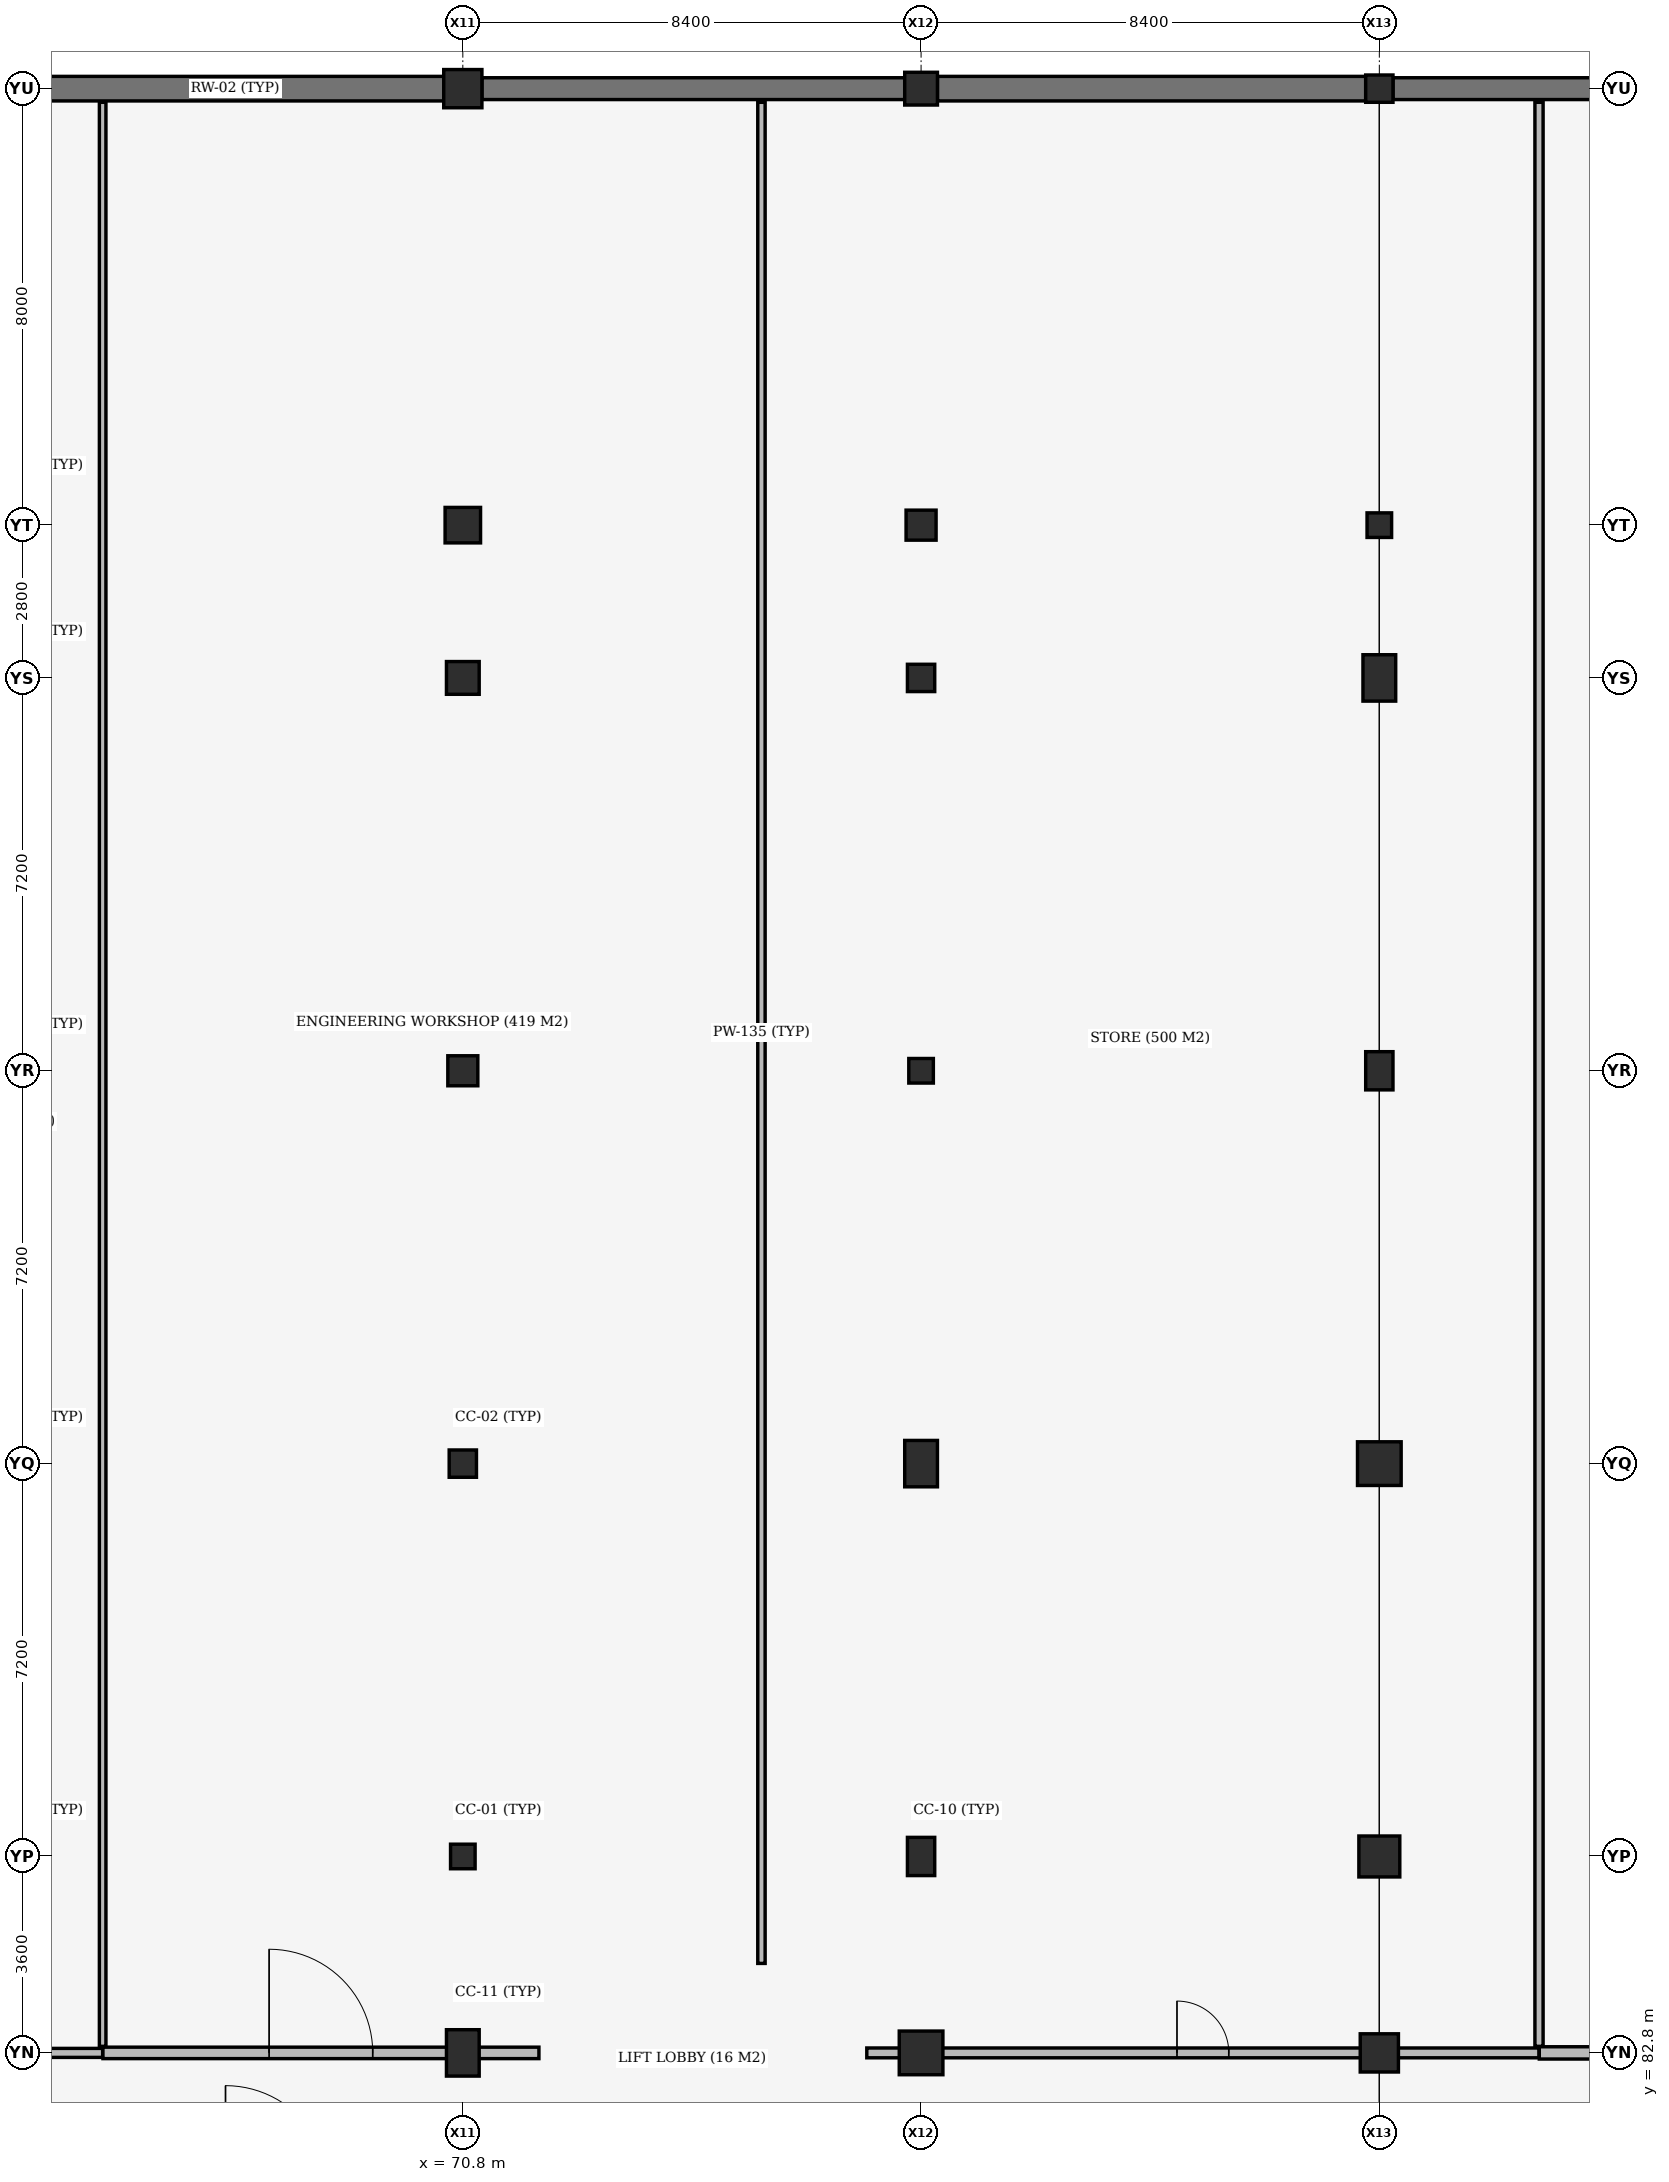
"""IFC4 building model, lengths in metres.
Left out: names, types, materials, properties, quantities, classifications, styles, units other than length and angle.
Written with IfcOpenShell. Run it as: python <this file> out.ifc"""

import sys

from ifc_helpers import new_model, si_unit, direction, frame, frame_2d, origin, origin_2d, place, context, subcontext, project, spatial, rectangle, extrude, element, fill, save


model = new_model("IFC4")
c1 = context("Model", 3, precision=1e-05, world=origin(), true_north=direction((0.0, 1.0)))
c2 = subcontext(c1, "Body", "Model", "MODEL_VIEW")
j1 = project(units=[si_unit("LENGTHUNIT", "METRE"), si_unit("PLANEANGLEUNIT", "RADIAN")], contexts=[c1])
p1 = place(None, origin())
s1 = spatial("IfcSite", under=j1, at=p1, CompositionType="ELEMENT")
p2 = place(p1, origin())
s2 = spatial("IfcBuilding", under=s1, at=p2, CompositionType="ELEMENT")
p3 = place(p2, frame((0.0, 0.0, -4.5)))
s3 = spatial("IfcBuildingStorey", under=s2, at=p3, CompositionType="ELEMENT", Elevation=-4.5)
p4 = place(p3, frame((70.8, 82.8, -0.46), z_axis=(0.0, 0.0, 1.0), x_axis=(1.0, 0.0, 0.0)))
e1 = element("IfcColumn", 1, at=p4, inside=s3, PredefinedType="COLUMN", context=c2, shape_type="SweptSolid", body=[
    extrude(rectangle(XDim=0.6, YDim=0.85, at=origin_2d()), origin(), (0.0, 0.0, 1.0), 4.61),
])
p5 = place(p3, frame((70.8, 86.4, -0.46), z_axis=(0.0, 0.0, 1.0), x_axis=(1.0, 0.0, 0.0)))
e2 = element("IfcColumn", 2, at=p5, inside=s3, PredefinedType="COLUMN", context=c2, shape_type="SweptSolid", body=[
    extrude(rectangle(XDim=0.45, YDim=0.45, at=origin_2d()), origin(), (0.0, 0.0, 1.0), 4.61),
])
p6 = place(p3, frame((70.8, 93.6, -0.46), z_axis=(0.0, 0.0, 1.0), x_axis=(1.0, 0.0, 0.0)))
e3 = element("IfcColumn", 3, at=p6, inside=s3, PredefinedType="COLUMN", context=c2, shape_type="SweptSolid", body=[
    extrude(rectangle(XDim=0.5, YDim=0.5, at=origin_2d()), origin(), (0.0, 0.0, 1.0), 4.72),
])
p7 = place(p3, frame((70.8, 100.8, -0.46), z_axis=(0.0, 0.0, 1.0), x_axis=(1.0, 0.0, 0.0)))
e4 = element("IfcColumn", 4, at=p7, inside=s3, PredefinedType="COLUMN", context=c2, shape_type="SweptSolid", body=[
    extrude(rectangle(XDim=0.55, YDim=0.55, at=origin_2d()), origin(), (0.0, 0.0, 1.0), 4.72),
])
p8 = place(p3, frame((70.8, 108.0, -0.46), z_axis=(0.0, 0.0, 1.0), x_axis=(1.0, 0.0, 0.0)))
e5 = element("IfcColumn", 5, at=p8, inside=s3, PredefinedType="COLUMN", context=c2, shape_type="SweptSolid", body=[
    extrude(rectangle(XDim=0.6, YDim=0.6, at=origin_2d()), origin(), (0.0, 0.0, 1.0), 4.61),
])
p9 = place(p3, frame((70.8, 110.8, -0.46), z_axis=(0.0, 0.0, 1.0), x_axis=(1.0, 0.0, 0.0)))
e6 = element("IfcColumn", 6, at=p9, inside=s3, PredefinedType="COLUMN", context=c2, shape_type="SweptSolid", body=[
    extrude(rectangle(XDim=0.65, YDim=0.65, at=origin_2d()), origin(), (0.0, 0.0, 1.0), 4.61),
])
p10 = place(p3, frame((70.8, 118.8, -0.46), z_axis=(0.0, 0.0, 1.0), x_axis=(1.0, 0.0, 0.0)))
e7 = element("IfcColumn", 7, at=p10, inside=s3, PredefinedType="COLUMN", context=c2, shape_type="SweptSolid", body=[
    extrude(rectangle(XDim=0.7, YDim=0.7, at=origin_2d()), origin(), (0.0, 0.0, 1.0), 4.61),
])
p11 = place(p3, frame((79.2, 82.8, -0.46), z_axis=(0.0, 0.0, 1.0), x_axis=(1.0, 0.0, 0.0)))
e8 = element("IfcColumn", 8, at=p11, inside=s3, PredefinedType="COLUMN", context=c2, shape_type="SweptSolid", body=[
    extrude(rectangle(XDim=0.8, YDim=0.8, at=origin_2d()), origin(), (0.0, 0.0, 1.0), 4.61),
])
p12 = place(p3, frame((79.2, 86.4, -0.46), z_axis=(0.0, 0.0, 1.0), x_axis=(1.0, 0.0, 0.0)))
e9 = element("IfcColumn", 9, at=p12, inside=s3, PredefinedType="COLUMN", context=c2, shape_type="SweptSolid", body=[
    extrude(rectangle(XDim=0.5, YDim=0.7, at=origin_2d()), origin(), (0.0, 0.0, 1.0), 4.61),
])
p13 = place(p3, frame((79.2, 93.6, -0.46), z_axis=(0.0, 0.0, 1.0), x_axis=(1.0, 0.0, 0.0)))
e10 = element("IfcColumn", 10, at=p13, inside=s3, PredefinedType="COLUMN", context=c2, shape_type="SweptSolid", body=[
    extrude(rectangle(XDim=0.6, YDim=0.85, at=origin_2d()), origin(), (0.0, 0.0, 1.0), 4.72),
])
p14 = place(p3, frame((79.2, 100.8, -0.46), z_axis=(0.0, 0.0, 1.0), x_axis=(1.0, 0.0, 0.0)))
e11 = element("IfcColumn", 11, at=p14, inside=s3, PredefinedType="COLUMN", context=c2, shape_type="SweptSolid", body=[
    extrude(rectangle(XDim=0.45, YDim=0.45, at=origin_2d()), origin(), (0.0, 0.0, 1.0), 4.72),
])
p15 = place(p3, frame((79.2, 108.0, -0.46), z_axis=(0.0, 0.0, 1.0), x_axis=(1.0, 0.0, 0.0)))
e12 = element("IfcColumn", 12, at=p15, inside=s3, PredefinedType="COLUMN", context=c2, shape_type="SweptSolid", body=[
    extrude(rectangle(XDim=0.5, YDim=0.5, at=origin_2d()), origin(), (0.0, 0.0, 1.0), 4.61),
])
p16 = place(p3, frame((79.2, 110.8, -0.46), z_axis=(0.0, 0.0, 1.0), x_axis=(1.0, 0.0, 0.0)))
e13 = element("IfcColumn", 13, at=p16, inside=s3, PredefinedType="COLUMN", context=c2, shape_type="SweptSolid", body=[
    extrude(rectangle(XDim=0.55, YDim=0.55, at=origin_2d()), origin(), (0.0, 0.0, 1.0), 4.61),
])
p17 = place(p3, frame((79.2, 118.8, -0.46), z_axis=(0.0, 0.0, 1.0), x_axis=(1.0, 0.0, 0.0)))
e14 = element("IfcColumn", 14, at=p17, inside=s3, PredefinedType="COLUMN", context=c2, shape_type="SweptSolid", body=[
    extrude(rectangle(XDim=0.6, YDim=0.6, at=origin_2d()), origin(), (0.0, 0.0, 1.0), 4.61),
])
p18 = place(p3, frame((87.6, 82.8, -0.46), z_axis=(0.0, 0.0, 1.0), x_axis=(1.0, 0.0, 0.0)))
e15 = element("IfcColumn", 15, at=p18, inside=s3, PredefinedType="COLUMN", context=c2, shape_type="SweptSolid", body=[
    extrude(rectangle(XDim=0.7, YDim=0.7, at=origin_2d()), origin(), (0.0, 0.0, 1.0), 4.61),
])
p19 = place(p3, frame((87.6, 86.4, -0.46), z_axis=(0.0, 0.0, 1.0), x_axis=(1.0, 0.0, 0.0)))
e16 = element("IfcColumn", 16, at=p19, inside=s3, PredefinedType="COLUMN", context=c2, shape_type="SweptSolid", body=[
    extrude(rectangle(XDim=0.75, YDim=0.75, at=origin_2d()), origin(), (0.0, 0.0, 1.0), 4.61),
])
p20 = place(p3, frame((87.6, 93.6, -0.46), z_axis=(0.0, 0.0, 1.0), x_axis=(1.0, 0.0, 0.0)))
e17 = element("IfcColumn", 17, at=p20, inside=s3, PredefinedType="COLUMN", context=c2, shape_type="SweptSolid", body=[
    extrude(rectangle(XDim=0.8, YDim=0.8, at=origin_2d()), origin(), (0.0, 0.0, 1.0), 4.72),
])
p21 = place(p3, frame((87.6, 100.8, -0.46), z_axis=(0.0, 0.0, 1.0), x_axis=(1.0, 0.0, 0.0)))
e18 = element("IfcColumn", 18, at=p21, inside=s3, PredefinedType="COLUMN", context=c2, shape_type="SweptSolid", body=[
    extrude(rectangle(XDim=0.5, YDim=0.7, at=origin_2d()), origin(), (0.0, 0.0, 1.0), 4.72),
])
p22 = place(p3, frame((87.6, 108.0, -0.46), z_axis=(0.0, 0.0, 1.0), x_axis=(1.0, 0.0, 0.0)))
e19 = element("IfcColumn", 19, at=p22, inside=s3, PredefinedType="COLUMN", context=c2, shape_type="SweptSolid", body=[
    extrude(rectangle(XDim=0.6, YDim=0.85, at=origin_2d()), origin(), (0.0, 0.0, 1.0), 4.61),
])
p23 = place(p3, frame((87.6, 110.8, -0.46), z_axis=(0.0, 0.0, 1.0), x_axis=(1.0, 0.0, 0.0)))
e20 = element("IfcColumn", 20, at=p23, inside=s3, PredefinedType="COLUMN", context=c2, shape_type="SweptSolid", body=[
    extrude(rectangle(XDim=0.45, YDim=0.45, at=origin_2d()), origin(), (0.0, 0.0, 1.0), 4.61),
])
p24 = place(p3, frame((87.6, 118.8, -0.46), z_axis=(0.0, 0.0, 1.0), x_axis=(1.0, 0.0, 0.0)))
e21 = element("IfcColumn", 21, at=p24, inside=s3, PredefinedType="COLUMN", context=c2, shape_type="SweptSolid", body=[
    extrude(rectangle(XDim=0.5, YDim=0.5, at=origin_2d()), origin(), (0.0, 0.0, 1.0), 4.61),
])
p25 = place(p3, frame((62.8, 118.8, 0.0), z_axis=(0.0, 0.0, 1.0), x_axis=(1.0, 0.0, 0.0)))
e22 = element("IfcWall", 22, at=p25, inside=s3, PredefinedType="USERDEFINED", context=c2, shape_type="SweptSolid", body=[
    extrude(rectangle(XDim=7.65, YDim=0.45, at=frame_2d((3.825, 0.0))), origin(), (0.0, 0.0, 1.0), 4.15),
])
p26 = place(p3, frame((71.15, 118.8, 0.0), z_axis=(0.0, 0.0, 1.0), x_axis=(1.0, 0.0, 0.0)))
e23 = element("IfcWall", 23, at=p26, inside=s3, PredefinedType="USERDEFINED", context=c2, shape_type="SweptSolid", body=[
    extrude(rectangle(XDim=7.75, YDim=0.4, at=frame_2d((3.875, 0.0))), origin(), (0.0, 0.0, 1.0), 4.15),
])
p27 = place(p3, frame((79.5, 118.8, 0.0), z_axis=(0.0, 0.0, 1.0), x_axis=(1.0, 0.0, 0.0)))
e24 = element("IfcWall", 24, at=p27, inside=s3, PredefinedType="USERDEFINED", context=c2, shape_type="SweptSolid", body=[
    extrude(rectangle(XDim=7.85, YDim=0.45, at=frame_2d((3.925, 0.0))), origin(), (0.0, 0.0, 1.0), 4.15),
])
p28 = place(p3, frame((87.85, 118.8, 0.0), z_axis=(0.0, 0.0, 1.0), x_axis=(1.0, 0.0, 0.0)))
e25 = element("IfcWall", 25, at=p28, inside=s3, PredefinedType="USERDEFINED", context=c2, shape_type="SweptSolid", body=[
    extrude(rectangle(XDim=7.725, YDim=0.4, at=frame_2d((3.862, 0.0))), origin(), (0.0, 0.0, 1.0), 4.15),
])
p29 = place(p3, frame((54.3, 82.8, 0.0), z_axis=(0.0, 0.0, 1.0), x_axis=(1.0, 0.0, 0.0)))
e26 = element("IfcWall", 26, at=p29, inside=s3, PredefinedType="PARTITIONING", context=c2, shape_type="SweptSolid", body=[
    extrude(rectangle(XDim=9.898, YDim=0.165, at=frame_2d((4.949, 0.0))), origin(), (0.0, 0.0, 1.0), 3.35),
])
p30 = place(p29, frame((4.424, 0.0, 0.0)))
e27 = element("IfcOpeningElement", 27, at=p30, cuts=e26, PredefinedType="OPENING", context=c2, shape_type="SweptSolid", body=[
    extrude(rectangle(XDim=1.05, YDim=2.2, at=frame_2d((0.525, 1.1))), frame((0.0, 0.093, 0.0), z_axis=(0.0, -1.0, 0.0), x_axis=(1.0, 0.0, 0.0)), (0.0, 0.0, 1.0), 0.185),
])
p31 = place(p3, frame((64.198, 82.92, 0.0), z_axis=(0.0, 0.0, 1.0), x_axis=(0.0, 1.0, 0.0)))
e28 = element("IfcWall", 28, at=p31, inside=s3, PredefinedType="PARTITIONING", context=c2, shape_type="SweptSolid", body=[
    extrude(rectangle(XDim=35.63, YDim=0.12, at=frame_2d((17.815, 0.0))), origin(), (0.0, 0.0, 1.0), 3.35),
])
p32 = place(p3, frame((64.203, 82.8, 0.0), z_axis=(0.0, 0.0, 1.0), x_axis=(1.0, 0.0, 0.0)))
e29 = element("IfcWall", 29, at=p32, inside=s3, PredefinedType="STANDARD", context=c2, shape_type="SweptSolid", body=[
    extrude(rectangle(XDim=7.992, YDim=0.21, at=frame_2d((3.996, 0.0))), origin(), (0.0, 0.0, 1.0), 3.35),
])
p33 = place(p32, frame((3.046, 0.0, 0.0)))
e30 = element("IfcOpeningElement", 30, at=p33, cuts=e29, PredefinedType="OPENING", context=c2, shape_type="SweptSolid", body=[
    extrude(rectangle(XDim=1.9, YDim=2.35, at=frame_2d((0.95, 1.175))), frame((0.0, 0.115, 0.0), z_axis=(0.0, -1.0, 0.0), x_axis=(1.0, 0.0, 0.0)), (0.0, 0.0, 1.0), 0.23),
])
p34 = place(p3, frame((76.274, 84.44, 0.0), z_axis=(0.0, 0.0, 1.0), x_axis=(0.0, 1.0, 0.0)))
e31 = element("IfcWall", 31, at=p34, inside=s3, PredefinedType="PARTITIONING", context=c2, shape_type="SweptSolid", body=[
    extrude(rectangle(XDim=34.11, YDim=0.135, at=frame_2d((17.055, 0.0))), origin(), (0.0, 0.0, 1.0), 3.35),
])
p35 = place(p3, frame((78.205, 82.8, 0.0), z_axis=(0.0, 0.0, 1.0), x_axis=(1.0, 0.0, 0.0)))
e32 = element("IfcWall", 32, at=p35, inside=s3, PredefinedType="PARTITIONING", context=c2, shape_type="SweptSolid", body=[
    extrude(rectangle(XDim=12.322, YDim=0.18, at=frame_2d((6.161, 0.0))), origin(), (0.0, 0.0, 1.0), 3.35),
])
p36 = place(p35, frame((5.686, 0.0, 0.0)))
e33 = element("IfcOpeningElement", 33, at=p36, cuts=e32, PredefinedType="OPENING", context=c2, shape_type="SweptSolid", body=[
    extrude(rectangle(XDim=0.95, YDim=2.15, at=frame_2d((0.475, 1.075))), frame((0.0, 0.1, 0.0), z_axis=(0.0, -1.0, 0.0), x_axis=(1.0, 0.0, 0.0)), (0.0, 0.0, 1.0), 0.2),
])
p37 = place(p3, frame((90.527, 82.92, 0.0), z_axis=(0.0, 0.0, 1.0), x_axis=(0.0, 1.0, 0.0)))
e34 = element("IfcWall", 34, at=p37, inside=s3, PredefinedType="PARTITIONING", context=c2, shape_type="SweptSolid", body=[
    extrude(rectangle(XDim=35.63, YDim=0.15, at=frame_2d((17.815, 0.0))), origin(), (0.0, 0.0, 1.0), 3.35),
])
p38 = place(p3, frame((90.532, 82.8, 0.0), z_axis=(0.0, 0.0, 1.0), x_axis=(1.0, 0.0, 0.0)))
e35 = element("IfcWall", 35, at=p38, inside=s3, PredefinedType="STANDARD", context=c2, shape_type="SweptSolid", body=[
    extrude(rectangle(XDim=9.893, YDim=0.225, at=frame_2d((4.947, 0.0))), origin(), (0.0, 0.0, 1.0), 3.4),
])
p39 = place(p38, frame((2.885, 0.0, 0.0)))
e36 = element("IfcOpeningElement", 36, at=p39, cuts=e35, PredefinedType="OPENING", context=c2, shape_type="SweptSolid", body=[
    extrude(rectangle(XDim=1.65, YDim=2.25, at=frame_2d((0.825, 1.125))), frame((0.0, 0.123, 0.0), z_axis=(0.0, -1.0, 0.0), x_axis=(1.0, 0.0, 0.0)), (0.0, 0.0, 1.0), 0.245),
])
p40 = place(p33, origin())
e37 = element("IfcDoor", 37, at=p40, inside=s3, OperationType="DOUBLE_DOOR_SINGLE_SWING", PredefinedType="DOOR", context=c2, shape_type="SweptSolid", body=[
    extrude(rectangle(XDim=1.9, YDim=2.35, at=frame_2d((0.95, 1.175))), frame((0.0, 0.025, 0.0), z_axis=(0.0, -1.0, 0.0), x_axis=(1.0, 0.0, 0.0)), (0.0, 0.0, 1.0), 0.05),
])
fill(e30, e37)
p41 = place(p36, origin())
e38 = element("IfcDoor", 38, at=p41, inside=s3, OperationType="SINGLE_SWING_LEFT", PredefinedType="DOOR", context=c2, shape_type="SweptSolid", body=[
    extrude(rectangle(XDim=0.95, YDim=2.15, at=frame_2d((0.475, 1.075))), frame((0.0, 0.025, 0.0), z_axis=(0.0, -1.0, 0.0), x_axis=(1.0, 0.0, 0.0)), (0.0, 0.0, 1.0), 0.05),
])
fill(e33, e38)
save(model, sys.argv[1])
